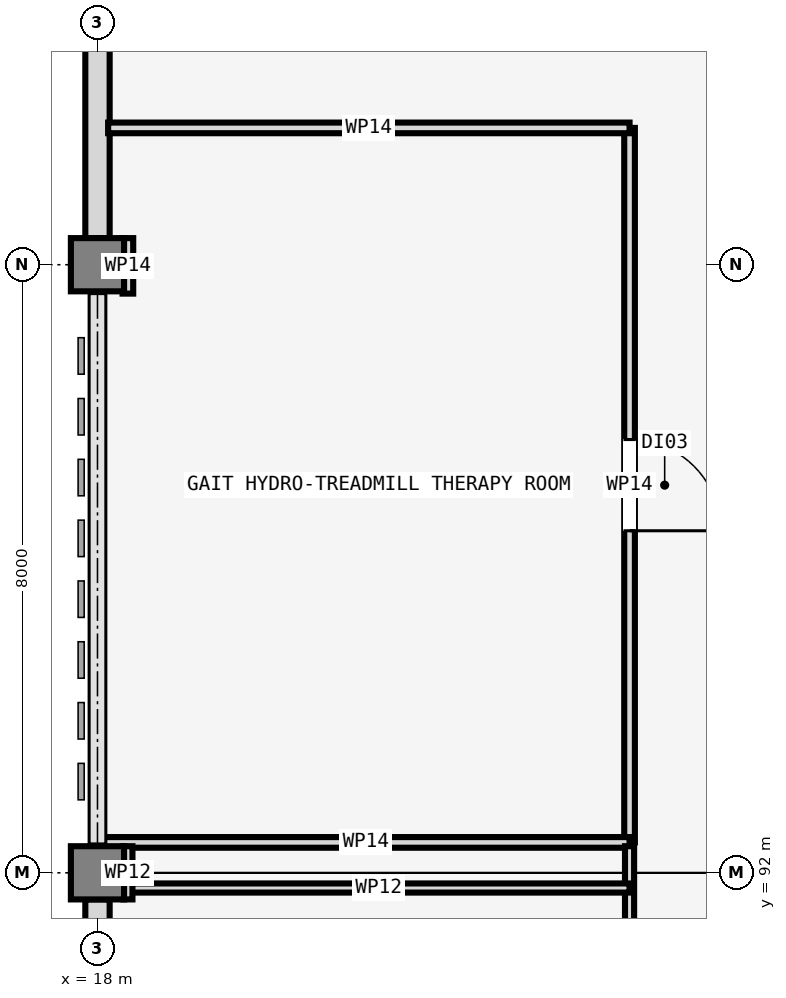
"""IFC4 building model, lengths in metres.
Left out: names, types, materials, properties, quantities, classifications, styles, units other than length and angle.
Written with IfcOpenShell. Run it as: python <this file> out.ifc"""

import sys

from ifc_helpers import new_model, si_unit, direction, frame, frame_2d, origin, origin_2d, place, context, subcontext, project, spatial, rectangle, extrude, element, fill, save


model = new_model("IFC4")
c1 = context("Model", 3, precision=1e-05, world=origin(), true_north=direction((0.0, 1.0)))
c2 = subcontext(c1, "Body", "Model", "MODEL_VIEW")
j1 = project(units=[si_unit("LENGTHUNIT", "METRE"), si_unit("PLANEANGLEUNIT", "RADIAN")], contexts=[c1])
p1 = place(None, origin())
s1 = spatial("IfcSite", under=j1, at=p1, CompositionType="ELEMENT")
p2 = place(p1, origin())
s2 = spatial("IfcBuilding", under=s1, at=p2, CompositionType="ELEMENT")
p3 = place(p2, origin())
s3 = spatial("IfcBuildingStorey", under=s2, at=p3, CompositionType="ELEMENT", Elevation=0.0)
for number, where, z_axis, x_axis in (
    (1, (18.0, 92.0, 0.0), (0.0, 0.0, 1.0), (1.0, 0.0, 0.0)),
    (2, (18.0, 100.0, 0.0), (0.0, 0.0, 1.0), (1.0, 0.0, 0.0)),
):
    element("IfcColumn", number, at=place(p3, frame(where, z_axis=z_axis, x_axis=x_axis)), inside=s3, PredefinedType="COLUMN", context=c2, shape_type="SweptSolid", body=[
        extrude(rectangle(XDim=0.7, YDim=0.7, at=origin_2d()), origin(), (0.0, 0.0, 1.0), 4.8),
    ])
p4 = place(p3, frame((18.0, 91.65, 0.0), z_axis=(0.0, 0.0, 1.0), x_axis=(0.0, -1.0, 0.0)))
e3 = element("IfcWall", 3, at=p4, inside=s3, PredefinedType="SOLIDWALL", context=c2, shape_type="SweptSolid", body=[
    extrude(rectangle(XDim=7.3, YDim=0.32, at=frame_2d((3.65, 0.0))), origin(), (0.0, 0.0, 1.0), 3.73),
])
p5 = place(p4, frame((2.8, 0.0, 0.95)))
e4 = element("IfcOpeningElement", 4, at=p5, cuts=e3, PredefinedType="OPENING", context=c2, shape_type="SweptSolid", body=[
    extrude(rectangle(XDim=1.7, YDim=1.55, at=frame_2d((0.85, 0.775))), frame((0.0, 0.17, 0.0), z_axis=(0.0, -1.0, 0.0), x_axis=(1.0, 0.0, 0.0)), (0.0, 0.0, 1.0), 0.34),
])
p6 = place(p3, frame((18.0, 107.65, 0.0), z_axis=(0.0, 0.0, 1.0), x_axis=(0.0, -1.0, 0.0)))
e5 = element("IfcWall", 5, at=p6, inside=s3, PredefinedType="SOLIDWALL", context=c2, shape_type="SweptSolid", body=[
    extrude(rectangle(XDim=7.3, YDim=0.32, at=frame_2d((3.65, 0.0))), origin(), (0.0, 0.0, 1.0), 3.73),
])
p7 = place(p6, frame((2.8, 0.0, 0.95)))
e6 = element("IfcOpeningElement", 6, at=p7, cuts=e5, PredefinedType="OPENING", context=c2, shape_type="SweptSolid", body=[
    extrude(rectangle(XDim=1.7, YDim=1.55, at=frame_2d((0.85, 0.775))), frame((0.0, 0.17, 0.0), z_axis=(0.0, -1.0, 0.0), x_axis=(1.0, 0.0, 0.0)), (0.0, 0.0, 1.0), 0.34),
])
p8 = place(p3, frame((25.0, 101.8, 0.0), z_axis=(0.0, 0.0, 1.0), x_axis=(0.0, -1.0, 0.0)))
e7 = element("IfcWall", 7, at=p8, inside=s3, PredefinedType="PARTITIONING", context=c2, shape_type="SweptSolid", body=[
    extrude(rectangle(XDim=9.4, YDim=0.14, at=frame_2d((4.7, 0.0))), origin(), (0.0, 0.0, 1.0), 3.68),
])
p9 = place(p8, frame((4.1, 0.0, 0.0)))
e8 = element("IfcOpeningElement", 8, at=p9, cuts=e7, PredefinedType="OPENING", context=c2, shape_type="SweptSolid", body=[
    extrude(rectangle(XDim=1.2, YDim=2.15, at=frame_2d((0.6, 1.075))), frame((0.0, 0.08, 0.0), z_axis=(0.0, -1.0, 0.0), x_axis=(1.0, 0.0, 0.0)), (0.0, 0.0, 1.0), 0.16),
])
p10 = place(p3, frame((18.14, 101.8, 0.0), z_axis=(0.0, 0.0, 1.0), x_axis=(1.0, 0.0, 0.0)))
e9 = element("IfcWall", 9, at=p10, inside=s3, PredefinedType="PARTITIONING", context=c2, shape_type="SweptSolid", body=[
    extrude(rectangle(XDim=6.86, YDim=0.14, at=frame_2d((3.43, 0.0))), origin(), (0.0, 0.0, 1.0), 3.68),
])
p11 = place(p3, frame((18.4, 99.62, 0.0), z_axis=(0.0, 0.0, 1.0), x_axis=(0.0, 1.0, 0.0)))
e10 = element("IfcWall", 10, at=p11, inside=s3, PredefinedType="PARTITIONING", context=c2, shape_type="SweptSolid", body=[
    extrude(rectangle(XDim=0.73, YDim=0.14, at=frame_2d((0.365, 0.0))), origin(), (0.0, 0.0, 1.0), 3.68),
])
p12 = place(p3, frame((25.0, 92.4, 0.0), z_axis=(0.0, 0.0, 1.0), x_axis=(-1.0, 0.0, 0.0)))
e11 = element("IfcWall", 11, at=p12, inside=s3, PredefinedType="PARTITIONING", context=c2, shape_type="SweptSolid", body=[
    extrude(rectangle(XDim=6.938, YDim=0.14, at=frame_2d((3.469, 0.0))), origin(), (0.0, 0.0, 1.0), 3.68),
])
p13 = place(p3, frame((25.0, 92.35, 0.0), z_axis=(0.0, 0.0, 1.0), x_axis=(0.0, -1.0, 0.0)))
e12 = element("IfcWall", 12, at=p13, inside=s3, PredefinedType="PARTITIONING", context=c2, shape_type="SweptSolid", body=[
    extrude(rectangle(XDim=34.68, YDim=0.12, at=frame_2d((17.34, 0.0))), origin(), (0.0, 0.0, 1.0), 3.68),
])
p14 = place(p13, frame((16.84, 0.0, 0.0)))
e13 = element("IfcOpeningElement", 13, at=p14, cuts=e12, PredefinedType="OPENING", context=c2, shape_type="SweptSolid", body=[
    extrude(rectangle(XDim=1.0, YDim=2.1, at=frame_2d((0.5, 1.05))), frame((0.0, 0.07, 0.0), z_axis=(0.0, -1.0, 0.0), x_axis=(1.0, 0.0, 0.0)), (0.0, 0.0, 1.0), 0.14),
])
p15 = place(p3, frame((18.4, 91.8, 0.0), z_axis=(0.0, 0.0, 1.0), x_axis=(1.0, 0.0, 0.0)))
e14 = element("IfcWall", 14, at=p15, inside=s3, PredefinedType="PARTITIONING", context=c2, shape_type="SweptSolid", body=[
    extrude(rectangle(XDim=6.6, YDim=0.12, at=frame_2d((3.3, 0.0))), origin(), (0.0, 0.0, 1.0), 3.68),
])
p16 = place(p3, frame((18.4, 91.65, 0.0), z_axis=(0.0, 0.0, 1.0), x_axis=(0.0, 1.0, 0.0)))
e15 = element("IfcWall", 15, at=p16, inside=s3, PredefinedType="PARTITIONING", context=c2, shape_type="SweptSolid", body=[
    extrude(rectangle(XDim=0.7, YDim=0.12, at=frame_2d((0.35, 0.0))), origin(), (0.0, 0.0, 1.0), 3.68),
])
p17 = place(p9, origin())
e16 = element("IfcDoor", 16, at=p17, inside=s3, OperationType="SINGLE_SWING_RIGHT", PredefinedType="DOOR", context=c2, shape_type="SweptSolid", body=[
    extrude(rectangle(XDim=1.2, YDim=2.15, at=frame_2d((0.6, 1.075))), frame((0.0, 0.025, 0.0), z_axis=(0.0, -1.0, 0.0), x_axis=(1.0, 0.0, 0.0)), (0.0, 0.0, 1.0), 0.05),
])
fill(e8, e16)
save(model, sys.argv[1])
